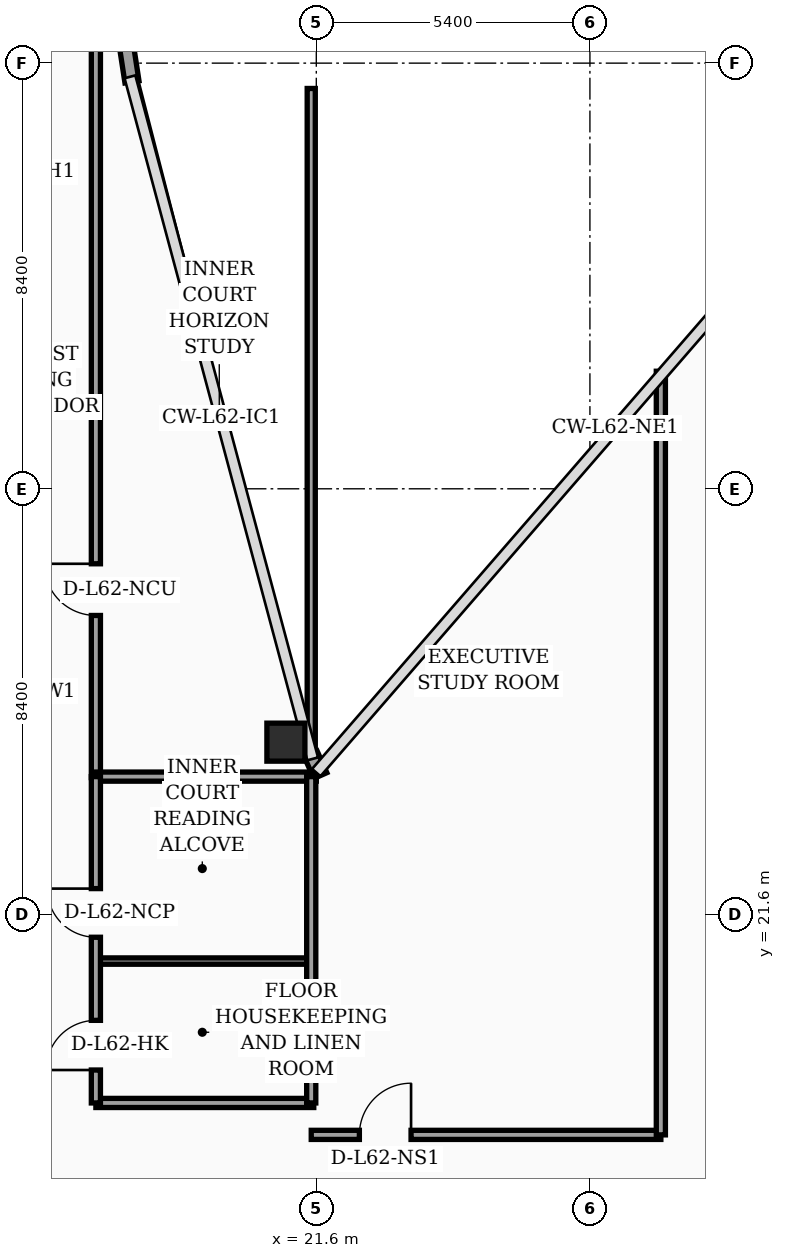
"""IFC4 building model, lengths in metres.
Left out: names, types, materials, properties, quantities, classifications, styles, units other than length and angle.
Written with IfcOpenShell. Run it as: python <this file> out.ifc"""

import sys

from ifc_helpers import new_model, si_unit, direction, frame, frame_2d, origin, origin_2d, place, context, subcontext, project, spatial, rectangle, hollow_rectangle, extrude, element, fill, save


model = new_model("IFC4")
c1 = context("Model", 3, precision=1e-05, world=origin(), true_north=direction((0.0, 1.0)))
c2 = subcontext(c1, "Body", "Model", "MODEL_VIEW")
j1 = project(units=[si_unit("LENGTHUNIT", "METRE"), si_unit("PLANEANGLEUNIT", "RADIAN")], contexts=[c1])
p1 = place(None, origin())
s1 = spatial("IfcSite", under=j1, at=p1, CompositionType="ELEMENT")
p2 = place(p1, origin())
s2 = spatial("IfcBuilding", under=s1, at=p2, CompositionType="ELEMENT")
p3 = place(p2, frame((0.0, 0.0, 251.4)))
s3 = spatial("IfcBuildingStorey", under=s2, at=p3, CompositionType="ELEMENT", Elevation=251.4)
p4 = place(p3, frame((21.0, 25.0, 0.0), z_axis=(0.0, 0.0, 1.0), x_axis=(1.0, 0.0, 0.0)))
e1 = element("IfcColumn", 1, at=p4, inside=s3, PredefinedType="COLUMN", context=c2, shape_type="SweptSolid", body=[
    extrude(hollow_rectangle(XDim=0.75, YDim=0.75, WallThickness=0.032, at=origin_2d()), origin(), (0.0, 0.0, 1.0), 3.56),
])
p5 = place(p3, frame((21.68, 24.34, 0.0), z_axis=(0.0, 0.0, 1.0), x_axis=(-0.40758134973, 0.913168901875, 0.0)))
e2 = element("IfcWall", 2, at=p5, inside=s3, PredefinedType="SOLIDWALL", context=c2, shape_type="SweptSolid", body=[
    extrude(rectangle(XDim=0.471, YDim=0.28, at=frame_2d((0.235, 0.0))), origin(), (0.0, 0.0, 1.0), 3.56),
])
p6 = place(p3, frame((17.962, 38.03, 0.0), z_axis=(0.0, 0.0, 1.0), x_axis=(-0.15141125477, 0.988470855377, 0.0)))
e3 = element("IfcWall", 3, at=p6, inside=s3, PredefinedType="SOLIDWALL", context=c2, shape_type="SweptSolid", body=[
    extrude(rectangle(XDim=0.739, YDim=0.28, at=frame_2d((0.369, 0.0))), origin(), (0.0, 0.0, 1.0), 3.56),
])
p7 = place(p3, frame((17.25, 24.3, 0.0), z_axis=(0.0, 0.0, 1.0), x_axis=(0.0, 1.0, 0.0)))
e4 = element("IfcWall", 4, at=p7, inside=s3, PredefinedType="PARTITIONING", context=c2, shape_type="SweptSolid", body=[
    extrude(rectangle(XDim=18.15, YDim=0.18, at=frame_2d((9.075, 0.0))), origin(), (0.0, 0.0, 1.0), 2.99),
])
p8 = place(p7, frame((3.2, 0.0, 0.0)))
e5 = element("IfcOpeningElement", 5, at=p8, cuts=e4, PredefinedType="OPENING", context=c2, shape_type="SweptSolid", body=[
    extrude(rectangle(XDim=1.02, YDim=2.2, at=frame_2d((0.51, 1.1))), frame((0.0, 0.1, 0.0), z_axis=(0.0, -1.0, 0.0), x_axis=(1.0, 0.0, 0.0)), (0.0, 0.0, 1.0), 0.2),
])
p9 = place(p3, frame((17.25, 17.88, 0.0), z_axis=(0.0, 0.0, 1.0), x_axis=(1.0, 0.0, 0.0)))
e6 = element("IfcWall", 6, at=p9, inside=s3, PredefinedType="PARTITIONING", context=c2, shape_type="SweptSolid", body=[
    extrude(rectangle(XDim=4.3, YDim=0.18, at=frame_2d((2.15, 0.0))), origin(), (0.0, 0.0, 1.0), 3.56),
])
p10 = place(p3, frame((17.25, 20.68, 0.0), z_axis=(0.0, 0.0, 1.0), x_axis=(1.0, 0.0, 0.0)))
e7 = element("IfcWall", 7, at=p10, inside=s3, PredefinedType="PARTITIONING", context=c2, shape_type="SweptSolid", body=[
    extrude(rectangle(XDim=4.3, YDim=0.125, at=frame_2d((2.15, 0.0))), origin(), (0.0, 0.0, 1.0), 3.56),
])
p11 = place(p3, frame((17.25, 24.32, 0.0), z_axis=(0.0, 0.0, 1.0), x_axis=(1.0, 0.0, 0.0)))
e8 = element("IfcWall", 8, at=p11, inside=s3, PredefinedType="PARTITIONING", context=c2, shape_type="SweptSolid", body=[
    extrude(rectangle(XDim=4.35, YDim=0.18, at=frame_2d((2.175, 0.0))), origin(), (0.0, 0.0, 1.0), 3.56),
])
p12 = place(p3, frame((21.5, 17.88, 0.0), z_axis=(0.0, 0.0, 1.0), x_axis=(0.0, 1.0, 0.0)))
e9 = element("IfcWall", 9, at=p12, inside=s3, PredefinedType="PARTITIONING", context=c2, shape_type="SweptSolid", body=[
    extrude(rectangle(XDim=6.44, YDim=0.18, at=frame_2d((3.22, 0.0))), origin(), (0.0, 0.0, 1.0), 3.09),
])
p13 = place(p3, frame((17.25, 17.88, 0.0), z_axis=(0.0, 0.0, 1.0), x_axis=(0.0, 1.0, 0.0)))
e10 = element("IfcWall", 10, at=p13, inside=s3, PredefinedType="PARTITIONING", context=c2, shape_type="SweptSolid", body=[
    extrude(rectangle(XDim=6.44, YDim=0.18, at=frame_2d((3.22, 0.0))), origin(), (0.0, 0.0, 1.0), 3.09),
])
p14 = place(p13, frame((0.65, 0.0, 0.0)))
e11 = element("IfcOpeningElement", 11, at=p14, cuts=e10, PredefinedType="OPENING", context=c2, shape_type="SweptSolid", body=[
    extrude(rectangle(XDim=0.98, YDim=2.15, at=frame_2d((0.49, 1.075))), frame((0.0, 0.1, 0.0), z_axis=(0.0, -1.0, 0.0), x_axis=(1.0, 0.0, 0.0)), (0.0, 0.0, 1.0), 0.2),
])
p15 = place(p13, frame((3.27, 0.0, 0.0)))
e12 = element("IfcOpeningElement", 12, at=p15, cuts=e10, PredefinedType="OPENING", context=c2, shape_type="SweptSolid", body=[
    extrude(rectangle(XDim=0.96, YDim=2.2, at=frame_2d((0.48, 1.1))), frame((0.0, 0.1, 0.0), z_axis=(0.0, -1.0, 0.0), x_axis=(1.0, 0.0, 0.0)), (0.0, 0.0, 1.0), 0.2),
])
p16 = place(p3, frame((21.5, 24.85, 0.0), z_axis=(0.0, 0.0, 1.0), x_axis=(0.0, 1.0, 0.0)))
e13 = element("IfcWall", 13, at=p16, inside=s3, PredefinedType="PARTITIONING", context=c2, shape_type="SweptSolid", body=[
    extrude(rectangle(XDim=13.05, YDim=0.16, at=frame_2d((6.525, 0.0))), origin(), (0.0, 0.0, 1.0), 2.99),
])
p17 = place(p3, frame((21.5, 17.25, 0.0), z_axis=(0.0, 0.0, 1.0), x_axis=(1.0, 0.0, 0.0)))
e14 = element("IfcWall", 14, at=p17, inside=s3, PredefinedType="PARTITIONING", context=c2, shape_type="SweptSolid", body=[
    extrude(rectangle(XDim=6.9, YDim=0.18, at=frame_2d((3.45, 0.0))), origin(), (0.0, 0.0, 1.0), 2.99),
])
p18 = place(p17, frame((0.95, 0.0, 0.0)))
e15 = element("IfcOpeningElement", 15, at=p18, cuts=e14, PredefinedType="OPENING", context=c2, shape_type="SweptSolid", body=[
    extrude(rectangle(XDim=1.02, YDim=2.2, at=frame_2d((0.51, 1.1))), frame((0.0, 0.1, 0.0), z_axis=(0.0, -1.0, 0.0), x_axis=(1.0, 0.0, 0.0)), (0.0, 0.0, 1.0), 0.2),
])
p19 = place(p3, frame((28.4, 17.25, 0.0), z_axis=(0.0, 0.0, 1.0), x_axis=(0.0, 1.0, 0.0)))
e16 = element("IfcWall", 16, at=p19, inside=s3, PredefinedType="PARTITIONING", context=c2, shape_type="SweptSolid", body=[
    extrude(rectangle(XDim=15.07, YDim=0.18, at=frame_2d((7.535, 0.0))), origin(), (0.0, 0.0, 1.0), 2.99),
])
p20 = place(p8, origin())
e17 = element("IfcDoor", 17, at=p20, inside=s3, OperationType="SINGLE_SWING_RIGHT", PredefinedType="DOOR", context=c2, shape_type="SweptSolid", body=[
    extrude(rectangle(XDim=1.02, YDim=2.2, at=frame_2d((0.51, 1.1))), frame((0.0, 0.025, 0.0), z_axis=(0.0, -1.0, 0.0), x_axis=(1.0, 0.0, 0.0)), (0.0, 0.0, 1.0), 0.05),
])
fill(e5, e17)
p21 = place(p14, origin())
e18 = element("IfcDoor", 18, at=p21, inside=s3, OperationType="SINGLE_SWING_LEFT", PredefinedType="DOOR", context=c2, shape_type="SweptSolid", body=[
    extrude(rectangle(XDim=0.98, YDim=2.15, at=frame_2d((0.49, 1.075))), frame((0.0, 0.025, 0.0), z_axis=(0.0, -1.0, 0.0), x_axis=(1.0, 0.0, 0.0)), (0.0, 0.0, 1.0), 0.05),
])
fill(e11, e18)
p22 = place(p15, origin())
e19 = element("IfcDoor", 19, at=p22, inside=s3, OperationType="SINGLE_SWING_RIGHT", PredefinedType="DOOR", context=c2, shape_type="SweptSolid", body=[
    extrude(rectangle(XDim=0.96, YDim=2.2, at=frame_2d((0.48, 1.1))), frame((0.0, 0.025, 0.0), z_axis=(0.0, -1.0, 0.0), x_axis=(1.0, 0.0, 0.0)), (0.0, 0.0, 1.0), 0.05),
])
fill(e12, e19)
p23 = place(p18, origin())
e20 = element("IfcDoor", 20, at=p23, inside=s3, OperationType="SINGLE_SWING_RIGHT", PredefinedType="DOOR", context=c2, shape_type="SweptSolid", body=[
    extrude(rectangle(XDim=1.02, YDim=2.2, at=frame_2d((0.51, 1.1))), frame((0.0, 0.025, 0.0), z_axis=(0.0, -1.0, 0.0), x_axis=(1.0, 0.0, 0.0)), (0.0, 0.0, 1.0), 0.05),
])
fill(e15, e20)
save(model, sys.argv[1])
